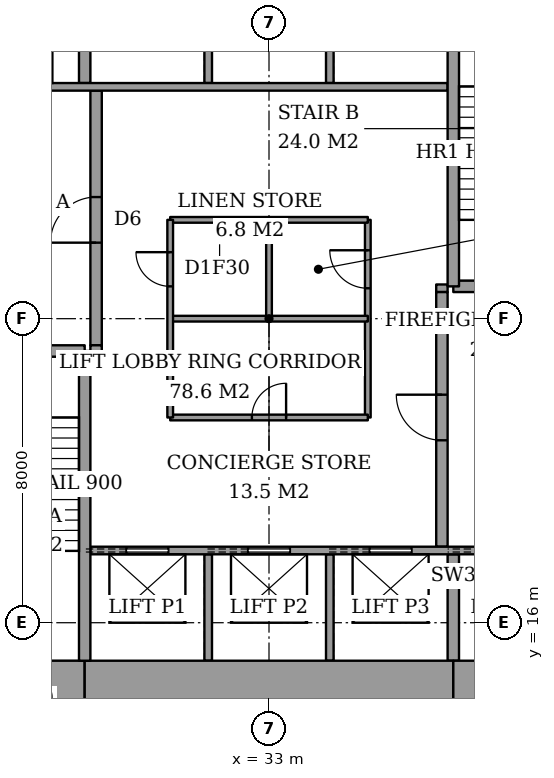
"""IFC4 building model, lengths in metres.
Left out: names, types, materials, properties, quantities, classifications, styles, units other than length and angle.
Written with IfcOpenShell. Run it as: python <this file> out.ifc"""

import sys

from ifc_helpers import new_model, si_unit, direction, frame, frame_2d, origin, place, context, subcontext, project, spatial, rectangle, extrude, element, fill, save


model = new_model("IFC4")
c1 = context("Model", 3, precision=1e-05, world=origin(), true_north=direction((0.0, 1.0)))
c2 = subcontext(c1, "Body", "Model", "MODEL_VIEW")
j1 = project(units=[si_unit("LENGTHUNIT", "METRE"), si_unit("PLANEANGLEUNIT", "RADIAN")], contexts=[c1])
p1 = place(None, origin())
s1 = spatial("IfcSite", under=j1, at=p1, CompositionType="ELEMENT")
p2 = place(p1, origin())
s2 = spatial("IfcBuilding", under=s1, at=p2, CompositionType="ELEMENT")
p3 = place(p2, frame((0.0, 0.0, 16.0)))
s3 = spatial("IfcBuildingStorey", under=s2, at=p3, CompositionType="ELEMENT", Elevation=16.0)
p4 = place(p3, frame((25.0, 14.0, 0.0), z_axis=(0.0, 0.0, 1.0), x_axis=(1.0, 0.0, 0.0)))
e1 = element("IfcWall", 1, at=p4, inside=s3, PredefinedType="SHEAR", context=c2, shape_type="SweptSolid", body=[
    extrude(rectangle(XDim=3.15, YDim=2.0, at=frame_2d((1.575, 0.0))), origin(), (0.0, 0.0, 1.0), 5.0),
])
p5 = place(p3, frame((28.15, 14.0, 0.0), z_axis=(0.0, 0.0, 1.0), x_axis=(1.0, 0.0, 0.0)))
e2 = element("IfcWall", 2, at=p5, inside=s3, PredefinedType="SHEAR", context=c2, shape_type="SweptSolid", body=[
    extrude(rectangle(XDim=9.7, YDim=2.0, at=frame_2d((4.85, 0.0))), origin(), (0.0, 0.0, 1.0), 5.0),
])
p6 = place(p3, frame((37.85, 14.0, 0.0), z_axis=(0.0, 0.0, 1.0), x_axis=(1.0, 0.0, 0.0)))
e3 = element("IfcWall", 3, at=p6, inside=s3, PredefinedType="SHEAR", context=c2, shape_type="SweptSolid", body=[
    extrude(rectangle(XDim=3.15, YDim=2.0, at=frame_2d((1.575, 0.0))), origin(), (0.0, 0.0, 1.0), 5.0),
])
p7 = place(p3, frame((28.15, 15.0, 0.0), z_axis=(0.0, 0.0, 1.0), x_axis=(0.0, 1.0, 0.0)))
e4 = element("IfcWall", 4, at=p7, inside=s3, PredefinedType="SHEAR", context=c2, shape_type="SweptSolid", body=[
    extrude(rectangle(XDim=8.15, YDim=0.3, at=frame_2d((4.075, 0.0))), origin(), (0.0, 0.0, 1.0), 5.0),
])
p8 = place(p3, frame((25.0, 23.15, 0.0), z_axis=(0.0, 0.0, 1.0), x_axis=(1.0, 0.0, 0.0)))
e5 = element("IfcWall", 5, at=p8, inside=s3, PredefinedType="SHEAR", context=c2, shape_type="SweptSolid", body=[
    extrude(rectangle(XDim=3.15, YDim=0.3, at=frame_2d((1.575, 0.0))), origin(), (0.0, 0.0, 1.0), 5.0),
])
p9 = place(p8, frame((0.6, 0.0, 0.0)))
e6 = element("IfcOpeningElement", 6, at=p9, cuts=e5, PredefinedType="OPENING", context=c2, shape_type="SweptSolid", body=[
    extrude(rectangle(XDim=1.0, YDim=2.1, at=frame_2d((0.5, 1.05))), frame((0.0, 0.16, 0.0), z_axis=(0.0, -1.0, 0.0), x_axis=(1.0, 0.0, 0.0)), (0.0, 0.0, 1.0), 0.32),
])
p10 = place(p3, frame((37.85, 24.85, 0.0), z_axis=(0.0, 0.0, 1.0), x_axis=(0.0, 1.0, 0.0)))
e7 = element("IfcWall", 7, at=p10, inside=s3, PredefinedType="SHEAR", context=c2, shape_type="SweptSolid", body=[
    extrude(rectangle(XDim=8.15, YDim=0.3, at=frame_2d((4.075, 0.0))), origin(), (0.0, 0.0, 1.0), 5.0),
])
p11 = place(p3, frame((37.85, 24.85, 0.0), z_axis=(0.0, 0.0, 1.0), x_axis=(1.0, 0.0, 0.0)))
e8 = element("IfcWall", 8, at=p11, inside=s3, PredefinedType="SHEAR", context=c2, shape_type="SweptSolid", body=[
    extrude(rectangle(XDim=3.15, YDim=0.3, at=frame_2d((1.575, 0.0))), origin(), (0.0, 0.0, 1.0), 5.0),
])
p12 = place(p11, frame((0.95, 0.0, 0.0)))
e9 = element("IfcOpeningElement", 9, at=p12, cuts=e8, PredefinedType="OPENING", context=c2, shape_type="SweptSolid", body=[
    extrude(rectangle(XDim=1.0, YDim=2.1, at=frame_2d((0.5, 1.05))), frame((0.0, 0.16, 0.0), z_axis=(0.0, -1.0, 0.0), x_axis=(1.0, 0.0, 0.0)), (0.0, 0.0, 1.0), 0.32),
])
p13 = place(p3, frame((28.45, 23.3, 0.0), z_axis=(0.0, 0.0, 1.0), x_axis=(0.0, 1.0, 0.0)))
e10 = element("IfcWall", 10, at=p13, inside=s3, PredefinedType="PARTITIONING", context=c2, shape_type="SweptSolid", body=[
    extrude(rectangle(XDim=6.7, YDim=0.3, at=frame_2d((3.35, 0.0))), origin(), (0.0, 0.0, 1.0), 5.0),
])
p14 = place(p13, frame((2.7, 0.0, 0.0)))
e11 = element("IfcOpeningElement", 11, at=p14, cuts=e10, PredefinedType="OPENING", context=c2, shape_type="SweptSolid", body=[
    extrude(rectangle(XDim=1.2, YDim=2.1, at=frame_2d((0.6, 1.05))), frame((0.0, 0.16, 0.0), z_axis=(0.0, -1.0, 0.0), x_axis=(1.0, 0.0, 0.0)), (0.0, 0.0, 1.0), 0.32),
])
p15 = place(p3, frame((37.55, 18.0, 0.0), z_axis=(0.0, 0.0, 1.0), x_axis=(0.0, 1.0, 0.0)))
e12 = element("IfcWall", 12, at=p15, inside=s3, PredefinedType="PARTITIONING", context=c2, shape_type="SweptSolid", body=[
    extrude(rectangle(XDim=6.7, YDim=0.3, at=frame_2d((3.35, 0.0))), origin(), (0.0, 0.0, 1.0), 5.0),
])
p16 = place(p15, frame((2.8, 0.0, 0.0)))
e13 = element("IfcOpeningElement", 13, at=p16, cuts=e12, PredefinedType="OPENING", context=c2, shape_type="SweptSolid", body=[
    extrude(rectangle(XDim=1.2, YDim=2.1, at=frame_2d((0.6, 1.05))), frame((0.0, 0.16, 0.0), z_axis=(0.0, -1.0, 0.0), x_axis=(1.0, 0.0, 0.0)), (0.0, 0.0, 1.0), 0.32),
])
p17 = place(p3, frame((28.3, 17.9, 0.0), z_axis=(0.0, 0.0, 1.0), x_axis=(1.0, 0.0, 0.0)))
e14 = element("IfcWall", 14, at=p17, inside=s3, PredefinedType="PARTITIONING", context=c2, shape_type="SweptSolid", body=[
    extrude(rectangle(XDim=12.7, YDim=0.2, at=frame_2d((6.35, 0.0))), origin(), (0.0, 0.0, 1.0), 5.0),
])
p18 = place(p17, frame((0.95, 0.0, 0.0)))
e15 = element("IfcOpeningElement", 15, at=p18, cuts=e14, PredefinedType="OPENING", context=c2, shape_type="SweptSolid", body=[
    extrude(rectangle(XDim=1.1, YDim=2.1, at=frame_2d((0.55, 1.05))), frame((0.0, 0.11, 0.0), z_axis=(0.0, -1.0, 0.0), x_axis=(1.0, 0.0, 0.0)), (0.0, 0.0, 1.0), 0.22),
])
p19 = place(p17, frame((4.15, 0.0, 0.0)))
e16 = element("IfcOpeningElement", 16, at=p19, cuts=e14, PredefinedType="OPENING", context=c2, shape_type="SweptSolid", body=[
    extrude(rectangle(XDim=1.1, YDim=2.1, at=frame_2d((0.55, 1.05))), frame((0.0, 0.11, 0.0), z_axis=(0.0, -1.0, 0.0), x_axis=(1.0, 0.0, 0.0)), (0.0, 0.0, 1.0), 0.22),
])
p20 = place(p17, frame((7.35, 0.0, 0.0)))
e17 = element("IfcOpeningElement", 17, at=p20, cuts=e14, PredefinedType="OPENING", context=c2, shape_type="SweptSolid", body=[
    extrude(rectangle(XDim=1.1, YDim=2.1, at=frame_2d((0.55, 1.05))), frame((0.0, 0.11, 0.0), z_axis=(0.0, -1.0, 0.0), x_axis=(1.0, 0.0, 0.0)), (0.0, 0.0, 1.0), 0.22),
])
p21 = place(p17, frame((10.6, 0.0, 0.0)))
e18 = element("IfcOpeningElement", 18, at=p21, cuts=e14, PredefinedType="OPENING", context=c2, shape_type="SweptSolid", body=[
    extrude(rectangle(XDim=1.2, YDim=2.1, at=frame_2d((0.6, 1.05))), frame((0.0, 0.11, 0.0), z_axis=(0.0, -1.0, 0.0), x_axis=(1.0, 0.0, 0.0)), (0.0, 0.0, 1.0), 0.22),
])
p22 = place(p3, frame((25.0, 30.1, 0.0), z_axis=(0.0, 0.0, 1.0), x_axis=(1.0, 0.0, 0.0)))
e19 = element("IfcWall", 19, at=p22, inside=s3, PredefinedType="PARTITIONING", context=c2, shape_type="SweptSolid", body=[
    extrude(rectangle(XDim=12.7, YDim=0.2, at=frame_2d((6.35, 0.0))), origin(), (0.0, 0.0, 1.0), 5.0),
])
p23 = place(p22, frame((0.9, 0.0, 0.0)))
e20 = element("IfcOpeningElement", 20, at=p23, cuts=e19, PredefinedType="OPENING", context=c2, shape_type="SweptSolid", body=[
    extrude(rectangle(XDim=1.2, YDim=2.1, at=frame_2d((0.6, 1.05))), frame((0.0, 0.11, 0.0), z_axis=(0.0, -1.0, 0.0), x_axis=(1.0, 0.0, 0.0)), (0.0, 0.0, 1.0), 0.22),
])
for number, where, z_axis, x_axis in (
    (21, (31.4, 15.0, 0.0), (0.0, 0.0, 1.0), (0.0, 1.0, 0.0)),
    (22, (34.6, 15.0, 0.0), (0.0, 0.0, 1.0), (0.0, 1.0, 0.0)),
):
    element("IfcWall", number, at=place(p3, frame(where, z_axis=z_axis, x_axis=x_axis)), inside=s3, PredefinedType="PARTITIONING", context=c2, shape_type="SweptSolid", body=[
        extrude(rectangle(XDim=2.8, YDim=0.2, at=frame_2d((1.4, 0.0))), origin(), (0.0, 0.0, 1.0), 5.0),
    ])
p24 = place(p3, frame((37.85, 15.0, 0.0), z_axis=(0.0, 0.0, 1.0), x_axis=(0.0, 1.0, 0.0)))
e23 = element("IfcWall", 23, at=p24, inside=s3, PredefinedType="SHEAR", context=c2, shape_type="SweptSolid", body=[
    extrude(rectangle(XDim=2.8, YDim=0.3, at=frame_2d((1.4, 0.0))), origin(), (0.0, 0.0, 1.0), 5.0),
])
for number, where, z_axis, x_axis in (
    (24, (31.4, 30.2, 0.0), (0.0, 0.0, 1.0), (0.0, 1.0, 0.0)),
    (25, (34.6, 30.2, 0.0), (0.0, 0.0, 1.0), (0.0, 1.0, 0.0)),
):
    element("IfcWall", number, at=place(p3, frame(where, z_axis=z_axis, x_axis=x_axis)), inside=s3, PredefinedType="PARTITIONING", context=c2, shape_type="SweptSolid", body=[
        extrude(rectangle(XDim=2.8, YDim=0.2, at=frame_2d((1.4, 0.0))), origin(), (0.0, 0.0, 1.0), 5.0),
    ])
p25 = place(p3, frame((28.15, 30.2, 0.0), z_axis=(0.0, 0.0, 1.0), x_axis=(0.0, 1.0, 0.0)))
e26 = element("IfcWall", 26, at=p25, inside=s3, PredefinedType="SHEAR", context=c2, shape_type="SweptSolid", body=[
    extrude(rectangle(XDim=2.8, YDim=0.3, at=frame_2d((1.4, 0.0))), origin(), (0.0, 0.0, 1.0), 5.0),
])
for number, where, z_axis, x_axis in (
    (27, (28.3, 23.2, 0.0), (0.0, 0.0, 1.0), (1.0, 0.0, 0.0)),
    (28, (37.4, 24.8, 0.0), (0.0, 0.0, 1.0), (1.0, 0.0, 0.0)),
):
    element("IfcWall", number, at=place(p3, frame(where, z_axis=z_axis, x_axis=x_axis)), inside=s3, PredefinedType="PARTITIONING", context=c2, shape_type="SweptSolid", body=[
        extrude(rectangle(XDim=0.3, YDim=0.2, at=frame_2d((0.15, 0.0))), origin(), (0.0, 0.0, 1.0), 5.0),
    ])
p26 = place(p3, frame((30.4, 21.4, 0.0), z_axis=(0.0, 0.0, 1.0), x_axis=(1.0, 0.0, 0.0)))
e29 = element("IfcWall", 29, at=p26, inside=s3, PredefinedType="PARTITIONING", context=c2, shape_type="SweptSolid", body=[
    extrude(rectangle(XDim=5.2, YDim=0.15, at=frame_2d((2.6, 0.0))), origin(), (0.0, 0.0, 1.0), 4.7),
])
p27 = place(p26, frame((2.15, 0.0, 0.0)))
e30 = element("IfcOpeningElement", 30, at=p27, cuts=e29, PredefinedType="OPENING", context=c2, shape_type="SweptSolid", body=[
    extrude(rectangle(XDim=0.9, YDim=2.1, at=frame_2d((0.45, 1.05))), frame((0.0, 0.085, 0.0), z_axis=(0.0, -1.0, 0.0), x_axis=(1.0, 0.0, 0.0)), (0.0, 0.0, 1.0), 0.17),
])
p28 = place(p3, frame((30.4, 26.6, 0.0), z_axis=(0.0, 0.0, 1.0), x_axis=(1.0, 0.0, 0.0)))
e31 = element("IfcWall", 31, at=p28, inside=s3, PredefinedType="PARTITIONING", context=c2, shape_type="SweptSolid", body=[
    extrude(rectangle(XDim=5.2, YDim=0.15, at=frame_2d((2.6, 0.0))), origin(), (0.0, 0.0, 1.0), 4.7),
])
p29 = place(p3, frame((30.4, 21.4, 0.0), z_axis=(0.0, 0.0, 1.0), x_axis=(0.0, 1.0, 0.0)))
e32 = element("IfcWall", 32, at=p29, inside=s3, PredefinedType="PARTITIONING", context=c2, shape_type="SweptSolid", body=[
    extrude(rectangle(XDim=5.2, YDim=0.15, at=frame_2d((2.6, 0.0))), origin(), (0.0, 0.0, 1.0), 4.7),
])
p30 = place(p29, frame((3.45, 0.0, 0.0)))
e33 = element("IfcOpeningElement", 33, at=p30, cuts=e32, PredefinedType="OPENING", context=c2, shape_type="SweptSolid", body=[
    extrude(rectangle(XDim=0.9, YDim=2.1, at=frame_2d((0.45, 1.05))), frame((0.0, 0.085, 0.0), z_axis=(0.0, -1.0, 0.0), x_axis=(1.0, 0.0, 0.0)), (0.0, 0.0, 1.0), 0.17),
])
p31 = place(p3, frame((35.6, 21.4, 0.0), z_axis=(0.0, 0.0, 1.0), x_axis=(0.0, 1.0, 0.0)))
e34 = element("IfcWall", 34, at=p31, inside=s3, PredefinedType="PARTITIONING", context=c2, shape_type="SweptSolid", body=[
    extrude(rectangle(XDim=5.2, YDim=0.15, at=frame_2d((2.6, 0.0))), origin(), (0.0, 0.0, 1.0), 4.7),
])
p32 = place(p31, frame((3.4, 0.0, 0.0)))
e35 = element("IfcOpeningElement", 35, at=p32, cuts=e34, PredefinedType="OPENING", context=c2, shape_type="SweptSolid", body=[
    extrude(rectangle(XDim=1.0, YDim=2.1, at=frame_2d((0.5, 1.05))), frame((0.0, 0.085, 0.0), z_axis=(0.0, -1.0, 0.0), x_axis=(1.0, 0.0, 0.0)), (0.0, 0.0, 1.0), 0.17),
])
p33 = place(p3, frame((30.4, 24.0, 0.0), z_axis=(0.0, 0.0, 1.0), x_axis=(1.0, 0.0, 0.0)))
e36 = element("IfcWall", 36, at=p33, inside=s3, PredefinedType="PARTITIONING", context=c2, shape_type="SweptSolid", body=[
    extrude(rectangle(XDim=5.2, YDim=0.15, at=frame_2d((2.6, 0.0))), origin(), (0.0, 0.0, 1.0), 4.7),
])
p34 = place(p3, frame((33.0, 24.0, 0.0), z_axis=(0.0, 0.0, 1.0), x_axis=(0.0, 1.0, 0.0)))
e37 = element("IfcWall", 37, at=p34, inside=s3, PredefinedType="PARTITIONING", context=c2, shape_type="SweptSolid", body=[
    extrude(rectangle(XDim=2.6, YDim=0.15, at=frame_2d((1.3, 0.0))), origin(), (0.0, 0.0, 1.0), 4.7),
])
p35 = place(p14, origin())
e38 = element("IfcDoor", 38, at=p35, inside=s3, OperationType="SINGLE_SWING_RIGHT", PredefinedType="DOOR", context=c2, shape_type="SweptSolid", body=[
    extrude(rectangle(XDim=1.2, YDim=2.1, at=frame_2d((0.6, 1.05))), frame((0.0, 0.025, 0.0), z_axis=(0.0, -1.0, 0.0), x_axis=(1.0, 0.0, 0.0)), (0.0, 0.0, 1.0), 0.05),
])
fill(e11, e38)
p36 = place(p16, origin())
e39 = element("IfcDoor", 39, at=p36, inside=s3, OperationType="SINGLE_SWING_LEFT", PredefinedType="DOOR", context=c2, shape_type="SweptSolid", body=[
    extrude(rectangle(XDim=1.2, YDim=2.1, at=frame_2d((0.6, 1.05))), frame((0.0, 0.025, 0.0), z_axis=(0.0, -1.0, 0.0), x_axis=(1.0, 0.0, 0.0)), (0.0, 0.0, 1.0), 0.05),
])
fill(e13, e39)
p37 = place(p27, origin())
e40 = element("IfcDoor", 40, at=p37, inside=s3, OperationType="SINGLE_SWING_LEFT", PredefinedType="DOOR", context=c2, shape_type="SweptSolid", body=[
    extrude(rectangle(XDim=0.9, YDim=2.1, at=frame_2d((0.45, 1.05))), frame((0.0, 0.025, 0.0), z_axis=(0.0, -1.0, 0.0), x_axis=(1.0, 0.0, 0.0)), (0.0, 0.0, 1.0), 0.05),
])
fill(e30, e40)
p38 = place(p30, origin())
e41 = element("IfcDoor", 41, at=p38, inside=s3, OperationType="SINGLE_SWING_LEFT", PredefinedType="DOOR", context=c2, shape_type="SweptSolid", body=[
    extrude(rectangle(XDim=0.9, YDim=2.1, at=frame_2d((0.45, 1.05))), frame((0.0, 0.025, 0.0), z_axis=(0.0, -1.0, 0.0), x_axis=(1.0, 0.0, 0.0)), (0.0, 0.0, 1.0), 0.05),
])
fill(e33, e41)
p39 = place(p32, origin())
e42 = element("IfcDoor", 42, at=p39, inside=s3, OperationType="SINGLE_SWING_LEFT", PredefinedType="DOOR", context=c2, shape_type="SweptSolid", body=[
    extrude(rectangle(XDim=1.0, YDim=2.1, at=frame_2d((0.5, 1.05))), frame((0.0, 0.025, 0.0), z_axis=(0.0, -1.0, 0.0), x_axis=(1.0, 0.0, 0.0)), (0.0, 0.0, 1.0), 0.05),
])
fill(e35, e42)
p40 = place(p18, origin())
e43 = element("IfcDoor", 43, at=p40, inside=s3, OperationType="SLIDING_TO_LEFT", PredefinedType="DOOR", context=c2, shape_type="SweptSolid", body=[
    extrude(rectangle(XDim=1.1, YDim=2.1, at=frame_2d((0.55, 1.05))), frame((0.0, 0.025, 0.0), z_axis=(0.0, -1.0, 0.0), x_axis=(1.0, 0.0, 0.0)), (0.0, 0.0, 1.0), 0.05),
])
fill(e15, e43)
p41 = place(p19, origin())
e44 = element("IfcDoor", 44, at=p41, inside=s3, OperationType="SLIDING_TO_LEFT", PredefinedType="DOOR", context=c2, shape_type="SweptSolid", body=[
    extrude(rectangle(XDim=1.1, YDim=2.1, at=frame_2d((0.55, 1.05))), frame((0.0, 0.025, 0.0), z_axis=(0.0, -1.0, 0.0), x_axis=(1.0, 0.0, 0.0)), (0.0, 0.0, 1.0), 0.05),
])
fill(e16, e44)
p42 = place(p20, origin())
e45 = element("IfcDoor", 45, at=p42, inside=s3, OperationType="SLIDING_TO_LEFT", PredefinedType="DOOR", context=c2, shape_type="SweptSolid", body=[
    extrude(rectangle(XDim=1.1, YDim=2.1, at=frame_2d((0.55, 1.05))), frame((0.0, 0.025, 0.0), z_axis=(0.0, -1.0, 0.0), x_axis=(1.0, 0.0, 0.0)), (0.0, 0.0, 1.0), 0.05),
])
fill(e17, e45)
save(model, sys.argv[1])
